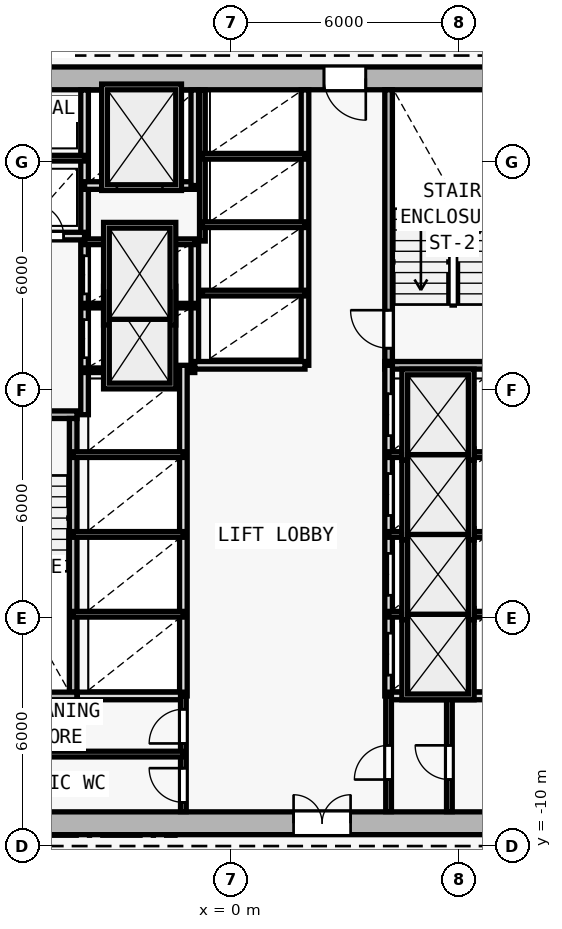
"""IFC4 building model, lengths in metres.
Left out: names, types, materials, properties, quantities, classifications, styles, units other than length and angle.
Written with IfcOpenShell. Run it as: python <this file> out.ifc"""

import sys

from ifc_helpers import new_model, si_unit, direction, frame, frame_2d, origin, origin_2d, place, context, subcontext, project, spatial, rectangle, i_section, extrude, element, fill, save


model = new_model("IFC4")
c1 = context("Model", 3, precision=1e-05, world=origin(), true_north=direction((0.0, 1.0)))
c2 = subcontext(c1, "Body", "Model", "MODEL_VIEW")
j1 = project(units=[si_unit("LENGTHUNIT", "METRE"), si_unit("PLANEANGLEUNIT", "RADIAN")], contexts=[c1])
p1 = place(None, origin())
s1 = spatial("IfcSite", under=j1, at=p1, CompositionType="ELEMENT")
p2 = place(p1, origin())
s2 = spatial("IfcBuilding", under=s1, at=p2, CompositionType="ELEMENT")
p3 = place(p2, frame((0.0, 0.0, 69.6)))
s3 = spatial("IfcBuildingStorey", under=s2, at=p3, CompositionType="ELEMENT", Elevation=69.6)
p4 = place(p3, frame((0.0, -9.4, 0.0), z_axis=(0.0, 0.0, 1.0), x_axis=(1.0, 0.0, 0.0)))
e1 = element("IfcColumn", 1, at=p4, inside=s3, PredefinedType="COLUMN", context=c2, shape_type="SweptSolid", body=[
    extrude(i_section(OverallWidth=0.416, OverallDepth=0.446, WebThickness=0.025, FlangeThickness=0.04, FilletRadius=0.015, at=origin_2d()), origin(), (0.0, 0.0, 1.0), 3.6),
])
p5 = place(p3, frame((-8.0, -9.4, 0.0), z_axis=(0.0, 0.0, 1.0), x_axis=(1.0, 0.0, 0.0)))
e2 = element("IfcWall", 2, at=p5, inside=s3, PredefinedType="SHEAR", context=c2, shape_type="SweptSolid", body=[
    extrude(rectangle(XDim=16.0, YDim=0.6, at=frame_2d((8.0, 0.0))), origin(), (0.0, 0.0, 1.0), 3.28),
])
p6 = place(p5, frame((9.65, 0.0, 0.0)))
e3 = element("IfcOpeningElement", 3, at=p6, cuts=e2, PredefinedType="OPENING", context=c2, shape_type="SweptSolid", body=[
    extrude(rectangle(XDim=1.5, YDim=2.2, at=frame_2d((0.75, 1.1))), frame((0.0, 0.31, 0.0), z_axis=(0.0, -1.0, 0.0), x_axis=(1.0, 0.0, 0.0)), (0.0, 0.0, 1.0), 0.62),
])
p7 = place(p3, frame((8.0, 10.2, 0.0), z_axis=(0.0, 0.0, 1.0), x_axis=(-1.0, 0.0, 0.0)))
e4 = element("IfcWall", 4, at=p7, inside=s3, PredefinedType="SHEAR", context=c2, shape_type="SweptSolid", body=[
    extrude(rectangle(XDim=16.0, YDim=0.6, at=frame_2d((8.0, 0.0))), origin(), (0.0, 0.0, 1.0), 3.28),
])
p8 = place(p7, frame((4.45, 0.0, 0.0)))
e5 = element("IfcOpeningElement", 5, at=p8, cuts=e4, PredefinedType="OPENING", context=c2, shape_type="SweptSolid", body=[
    extrude(rectangle(XDim=1.1, YDim=2.15, at=frame_2d((0.55, 1.075))), frame((0.0, 0.31, 0.0), z_axis=(0.0, -1.0, 0.0), x_axis=(1.0, 0.0, 0.0)), (0.0, 0.0, 1.0), 0.62),
])
p9 = place(p3, frame((-7.4, 1.35, 0.0), z_axis=(0.0, 0.0, 1.0), x_axis=(1.0, 0.0, 0.0)))
e6 = element("IfcWall", 6, at=p9, inside=s3, PredefinedType="SOLIDWALL", context=c2, shape_type="SweptSolid", body=[
    extrude(rectangle(XDim=3.35, YDim=0.2, at=frame_2d((1.675, 0.0))), origin(), (0.0, 0.0, 1.0), 3.28),
])
p10 = place(p9, frame((0.65, 0.0, 0.0)))
e7 = element("IfcOpeningElement", 7, at=p10, cuts=e6, PredefinedType="OPENING", context=c2, shape_type="SweptSolid", body=[
    extrude(rectangle(XDim=1.0, YDim=2.15, at=frame_2d((0.5, 1.075))), frame((0.0, 0.11, 0.0), z_axis=(0.0, -1.0, 0.0), x_axis=(1.0, 0.0, 0.0)), (0.0, 0.0, 1.0), 0.22),
])
p11 = place(p3, frame((-4.15, -5.95, 0.0), z_axis=(0.0, 0.0, 1.0), x_axis=(0.0, 1.0, 0.0)))
e8 = element("IfcWall", 8, at=p11, inside=s3, PredefinedType="SOLIDWALL", context=c2, shape_type="SweptSolid", body=[
    extrude(rectangle(XDim=7.2, YDim=0.2, at=frame_2d((3.6, 0.0))), origin(), (0.0, 0.0, 1.0), 3.28),
])
p12 = place(p3, frame((-3.85, 1.35, 0.0), z_axis=(0.0, 0.0, 1.0), x_axis=(0.0, 1.0, 0.0)))
e9 = element("IfcWall", 9, at=p12, inside=s3, PredefinedType="SOLIDWALL", context=c2, shape_type="SweptSolid", body=[
    extrude(rectangle(XDim=8.545, YDim=0.2, at=frame_2d((4.272, 0.0))), origin(), (0.0, 0.0, 1.0), 3.28),
])
p13 = place(p12, frame((1.5, 0.0, 0.0)))
e10 = element("IfcOpeningElement", 10, at=p13, cuts=e9, PredefinedType="OPENING", context=c2, shape_type="SweptSolid", body=[
    extrude(rectangle(XDim=1.0, YDim=2.15, at=frame_2d((0.5, 1.075))), frame((0.0, 0.11, 0.0), z_axis=(0.0, -1.0, 0.0), x_axis=(1.0, 0.0, 0.0)), (0.0, 0.0, 1.0), 0.22),
])
p14 = place(p12, frame((3.18, 0.0, 0.0)))
e11 = element("IfcOpeningElement", 11, at=p14, cuts=e9, PredefinedType="OPENING", context=c2, shape_type="SweptSolid", body=[
    extrude(rectangle(XDim=1.0, YDim=2.15, at=frame_2d((0.5, 1.075))), frame((0.0, 0.11, 0.0), z_axis=(0.0, -1.0, 0.0), x_axis=(1.0, 0.0, 0.0)), (0.0, 0.0, 1.0), 0.22),
])
p15 = place(p3, frame((-7.395, 6.05, 0.0), z_axis=(0.0, 0.0, 1.0), x_axis=(1.0, 0.0, 0.0)))
e12 = element("IfcWall", 12, at=p15, inside=s3, PredefinedType="SOLIDWALL", context=c2, shape_type="SweptSolid", body=[
    extrude(rectangle(XDim=3.545, YDim=0.2, at=frame_2d((1.772, 0.0))), origin(), (0.0, 0.0, 1.0), 3.28),
])
p16 = place(p15, frame((0.345, 0.0, 0.0)))
e13 = element("IfcOpeningElement", 13, at=p16, cuts=e12, PredefinedType="OPENING", context=c2, shape_type="SweptSolid", body=[
    extrude(rectangle(XDim=0.85, YDim=2.1, at=frame_2d((0.425, 1.05))), frame((0.0, 0.11, 0.0), z_axis=(0.0, -1.0, 0.0), x_axis=(1.0, 0.0, 0.0)), (0.0, 0.0, 1.0), 0.22),
])
p17 = place(p15, frame((2.145, 0.0, 0.0)))
e14 = element("IfcOpeningElement", 14, at=p17, cuts=e12, PredefinedType="OPENING", context=c2, shape_type="SweptSolid", body=[
    extrude(rectangle(XDim=0.85, YDim=2.1, at=frame_2d((0.425, 1.05))), frame((0.0, 0.11, 0.0), z_axis=(0.0, -1.0, 0.0), x_axis=(1.0, 0.0, 0.0)), (0.0, 0.0, 1.0), 0.22),
])
p18 = place(p3, frame((-7.395, 8.1, 0.0), z_axis=(0.0, 0.0, 1.0), x_axis=(1.0, 0.0, 0.0)))
e15 = element("IfcWall", 15, at=p18, inside=s3, PredefinedType="PARTITIONING", context=c2, shape_type="SweptSolid", body=[
    extrude(rectangle(XDim=3.545, YDim=0.15, at=frame_2d((1.772, 0.0))), origin(), (0.0, 0.0, 1.0), 3.28),
])
p19 = place(p3, frame((4.15, 2.75, 0.0), z_axis=(0.0, 0.0, 1.0), x_axis=(0.0, 1.0, 0.0)))
e16 = element("IfcWall", 16, at=p19, inside=s3, PredefinedType="SOLIDWALL", context=c2, shape_type="SweptSolid", body=[
    extrude(rectangle(XDim=7.15, YDim=0.2, at=frame_2d((3.575, 0.0))), origin(), (0.0, 0.0, 1.0), 3.28),
])
p20 = place(p19, frame((0.35, 0.0, 0.0)))
e17 = element("IfcOpeningElement", 17, at=p20, cuts=e16, PredefinedType="OPENING", context=c2, shape_type="SweptSolid", body=[
    extrude(rectangle(XDim=1.0, YDim=2.15, at=frame_2d((0.5, 1.075))), frame((0.0, 0.11, 0.0), z_axis=(0.0, -1.0, 0.0), x_axis=(1.0, 0.0, 0.0)), (0.0, 0.0, 1.0), 0.22),
])
p21 = place(p3, frame((4.05, 2.65, 0.0), z_axis=(0.0, 0.0, 1.0), x_axis=(1.0, 0.0, 0.0)))
e18 = element("IfcWall", 18, at=p21, inside=s3, PredefinedType="SOLIDWALL", context=c2, shape_type="SweptSolid", body=[
    extrude(rectangle(XDim=3.35, YDim=0.2, at=frame_2d((1.675, 0.0))), origin(), (0.0, 0.0, 1.0), 3.28),
])
p22 = place(p3, frame((-0.95, 2.65, 0.0), z_axis=(0.0, 0.0, 1.0), x_axis=(0.0, 1.0, 0.0)))
e19 = element("IfcWall", 19, at=p22, inside=s3, PredefinedType="SOLIDWALL", context=c2, shape_type="SweptSolid", body=[
    extrude(rectangle(XDim=3.27, YDim=0.2, at=frame_2d((1.635, 0.0))), origin(), (0.0, 0.0, 1.0), 3.28),
])
for number, where, z_axis, x_axis in (
    (20, (-3.85, 2.52, 0.0), (0.0, 0.0, 1.0), (1.0, 0.0, 0.0)),
    (21, (-3.85, 4.22, 0.0), (0.0, 0.0, 1.0), (1.0, 0.0, 0.0)),
):
    element("IfcWall", number, at=place(p3, frame(where, z_axis=z_axis, x_axis=x_axis)), inside=s3, PredefinedType="PARTITIONING", context=c2, shape_type="SweptSolid", body=[
        extrude(rectangle(XDim=2.9, YDim=0.12, at=frame_2d((1.45, 0.0))), origin(), (0.0, 0.0, 1.0), 3.28),
    ])
p23 = place(p3, frame((-3.85, 5.9, 0.0), z_axis=(0.0, 0.0, 1.0), x_axis=(1.0, 0.0, 0.0)))
e22 = element("IfcWall", 22, at=p23, inside=s3, PredefinedType="PARTITIONING", context=c2, shape_type="SweptSolid", body=[
    extrude(rectangle(XDim=2.9, YDim=0.15, at=frame_2d((1.45, 0.0))), origin(), (0.0, 0.0, 1.0), 3.28),
])
p24 = place(p3, frame((-3.85, 7.38, 0.0), z_axis=(0.0, 0.0, 1.0), x_axis=(1.0, 0.0, 0.0)))
e23 = element("IfcWall", 23, at=p24, inside=s3, PredefinedType="SOLIDWALL", context=c2, shape_type="SweptSolid", body=[
    extrude(rectangle(XDim=2.9, YDim=0.2, at=frame_2d((1.45, 0.0))), origin(), (0.0, 0.0, 1.0), 3.28),
])
p25 = place(p24, frame((0.85, 0.0, 0.0)))
e24 = element("IfcOpeningElement", 24, at=p25, cuts=e23, PredefinedType="OPENING", context=c2, shape_type="SweptSolid", body=[
    extrude(rectangle(XDim=1.2, YDim=2.2, at=frame_2d((0.6, 1.1))), frame((0.0, 0.11, 0.0), z_axis=(0.0, -1.0, 0.0), x_axis=(1.0, 0.0, 0.0)), (0.0, 0.0, 1.0), 0.22),
])
p26 = place(p3, frame((-0.95, 7.38, 0.0), z_axis=(0.0, 0.0, 1.0), x_axis=(0.0, 1.0, 0.0)))
e25 = element("IfcWall", 25, at=p26, inside=s3, PredefinedType="SOLIDWALL", context=c2, shape_type="SweptSolid", body=[
    extrude(rectangle(XDim=2.515, YDim=0.2, at=frame_2d((1.258, 0.0))), origin(), (0.0, 0.0, 1.0), 3.28),
])
p27 = place(p3, frame((4.15, -6.05, 0.0), z_axis=(0.0, 0.0, 1.0), x_axis=(0.0, 1.0, 0.0)))
e26 = element("IfcWall", 26, at=p27, inside=s3, PredefinedType="SOLIDWALL", context=c2, shape_type="SweptSolid", body=[
    extrude(rectangle(XDim=8.7, YDim=0.2, at=frame_2d((4.35, 0.0))), origin(), (0.0, 0.0, 1.0), 3.28),
])
p28 = place(p27, frame((0.55, 0.0, 0.0)))
e27 = element("IfcOpeningElement", 27, at=p28, cuts=e26, PredefinedType="OPENING", context=c2, shape_type="SweptSolid", body=[
    extrude(rectangle(XDim=1.1, YDim=2.15, at=frame_2d((0.55, 1.075))), frame((0.0, 0.11, 0.0), z_axis=(0.0, -1.0, 0.0), x_axis=(1.0, 0.0, 0.0)), (0.0, 0.0, 1.0), 0.22),
])
p29 = place(p27, frame((2.65, 0.0, 0.0)))
e28 = element("IfcOpeningElement", 28, at=p29, cuts=e26, PredefinedType="OPENING", context=c2, shape_type="SweptSolid", body=[
    extrude(rectangle(XDim=1.1, YDim=2.15, at=frame_2d((0.55, 1.075))), frame((0.0, 0.11, 0.0), z_axis=(0.0, -1.0, 0.0), x_axis=(1.0, 0.0, 0.0)), (0.0, 0.0, 1.0), 0.22),
])
p30 = place(p27, frame((4.75, 0.0, 0.0)))
e29 = element("IfcOpeningElement", 29, at=p30, cuts=e26, PredefinedType="OPENING", context=c2, shape_type="SweptSolid", body=[
    extrude(rectangle(XDim=1.1, YDim=2.15, at=frame_2d((0.55, 1.075))), frame((0.0, 0.11, 0.0), z_axis=(0.0, -1.0, 0.0), x_axis=(1.0, 0.0, 0.0)), (0.0, 0.0, 1.0), 0.22),
])
p31 = place(p27, frame((6.85, 0.0, 0.0)))
e30 = element("IfcOpeningElement", 30, at=p31, cuts=e26, PredefinedType="OPENING", context=c2, shape_type="SweptSolid", body=[
    extrude(rectangle(XDim=1.1, YDim=2.15, at=frame_2d((0.55, 1.075))), frame((0.0, 0.11, 0.0), z_axis=(0.0, -1.0, 0.0), x_axis=(1.0, 0.0, 0.0)), (0.0, 0.0, 1.0), 0.22),
])
for number, where, z_axis, x_axis in (
    (31, (4.15, -3.9, 0.0), (0.0, 0.0, 1.0), (1.0, 0.0, 0.0)),
    (32, (4.15, -1.8, 0.0), (0.0, 0.0, 1.0), (1.0, 0.0, 0.0)),
    (33, (4.15, 0.3, 0.0), (0.0, 0.0, 1.0), (1.0, 0.0, 0.0)),
):
    element("IfcWall", number, at=place(p3, frame(where, z_axis=z_axis, x_axis=x_axis)), inside=s3, PredefinedType="PARTITIONING", context=c2, shape_type="SweptSolid", body=[
        extrude(rectangle(XDim=2.6, YDim=0.15, at=frame_2d((1.3, 0.0))), origin(), (0.0, 0.0, 1.0), 3.28),
    ])
p32 = place(p3, frame((-1.25, -6.05, 0.0), z_axis=(0.0, 0.0, 1.0), x_axis=(0.0, 1.0, 0.0)))
e34 = element("IfcWall", 34, at=p32, inside=s3, PredefinedType="SOLIDWALL", context=c2, shape_type="SweptSolid", body=[
    extrude(rectangle(XDim=8.7, YDim=0.2, at=frame_2d((4.35, 0.0))), origin(), (0.0, 0.0, 1.0), 3.28),
])
for number, where, z_axis, x_axis in (
    (35, (-4.15, -3.9, 0.0), (0.0, 0.0, 1.0), (1.0, 0.0, 0.0)),
    (36, (-4.15, -1.8, 0.0), (0.0, 0.0, 1.0), (1.0, 0.0, 0.0)),
    (37, (-4.15, 0.3, 0.0), (0.0, 0.0, 1.0), (1.0, 0.0, 0.0)),
):
    element("IfcWall", number, at=place(p3, frame(where, z_axis=z_axis, x_axis=x_axis)), inside=s3, PredefinedType="PARTITIONING", context=c2, shape_type="SweptSolid", body=[
        extrude(rectangle(XDim=2.9, YDim=0.15, at=frame_2d((1.45, 0.0))), origin(), (0.0, 0.0, 1.0), 3.28),
    ])
p33 = place(p3, frame((1.95, 2.65, 0.0), z_axis=(0.0, 0.0, 1.0), x_axis=(0.0, 1.0, 0.0)))
e38 = element("IfcWall", 38, at=p33, inside=s3, PredefinedType="SOLIDWALL", context=c2, shape_type="SweptSolid", body=[
    extrude(rectangle(XDim=7.245, YDim=0.2, at=frame_2d((3.623, 0.0))), origin(), (0.0, 0.0, 1.0), 3.28),
])
p34 = place(p3, frame((-0.95, 2.65, 0.0), z_axis=(0.0, 0.0, 1.0), x_axis=(1.0, 0.0, 0.0)))
e39 = element("IfcWall", 39, at=p34, inside=s3, PredefinedType="SOLIDWALL", context=c2, shape_type="SweptSolid", body=[
    extrude(rectangle(XDim=2.9, YDim=0.2, at=frame_2d((1.45, 0.0))), origin(), (0.0, 0.0, 1.0), 3.28),
])
p35 = place(p3, frame((-0.75, 5.92, 0.0), z_axis=(0.0, 0.0, 1.0), x_axis=(0.0, 1.0, 0.0)))
e40 = element("IfcWall", 40, at=p35, inside=s3, PredefinedType="PARTITIONING", context=c2, shape_type="SweptSolid", body=[
    extrude(rectangle(XDim=3.975, YDim=0.15, at=frame_2d((1.988, 0.0))), origin(), (0.0, 0.0, 1.0), 3.28),
])
for number, where, z_axis, x_axis in (
    (41, (-0.75, 4.55, 0.0), (0.0, 0.0, 1.0), (1.0, 0.0, 0.0)),
    (42, (-0.75, 6.35, 0.0), (0.0, 0.0, 1.0), (1.0, 0.0, 0.0)),
    (43, (-0.75, 8.15, 0.0), (0.0, 0.0, 1.0), (1.0, 0.0, 0.0)),
):
    element("IfcWall", number, at=place(p3, frame(where, z_axis=z_axis, x_axis=x_axis)), inside=s3, PredefinedType="PARTITIONING", context=c2, shape_type="SweptSolid", body=[
        extrude(rectangle(XDim=2.7, YDim=0.15, at=frame_2d((1.35, 0.0))), origin(), (0.0, 0.0, 1.0), 3.28),
    ])
p36 = place(p3, frame((-7.4, -6.05, 0.0), z_axis=(0.0, 0.0, 1.0), x_axis=(1.0, 0.0, 0.0)))
e44 = element("IfcWall", 44, at=p36, inside=s3, PredefinedType="SOLIDWALL", context=c2, shape_type="SweptSolid", body=[
    extrude(rectangle(XDim=3.35, YDim=0.2, at=frame_2d((1.675, 0.0))), origin(), (0.0, 0.0, 1.0), 3.28),
])
p37 = place(p3, frame((-4.04, -6.05, 0.0), z_axis=(0.0, 0.0, 1.0), x_axis=(1.0, 0.0, 0.0)))
e45 = element("IfcWall", 45, at=p37, inside=s3, PredefinedType="SOLIDWALL", context=c2, shape_type="SweptSolid", body=[
    extrude(rectangle(XDim=2.79, YDim=0.2, at=frame_2d((1.395, 0.0))), origin(), (0.0, 0.0, 1.0), 3.28),
])
p38 = place(p3, frame((4.15, -6.05, 0.0), z_axis=(0.0, 0.0, 1.0), x_axis=(1.0, 0.0, 0.0)))
e46 = element("IfcWall", 46, at=p38, inside=s3, PredefinedType="SOLIDWALL", context=c2, shape_type="SweptSolid", body=[
    extrude(rectangle(XDim=3.245, YDim=0.2, at=frame_2d((1.623, 0.0))), origin(), (0.0, 0.0, 1.0), 3.28),
])
p39 = place(p3, frame((-1.25, -9.095, 0.0), z_axis=(0.0, 0.0, 1.0), x_axis=(0.0, 1.0, 0.0)))
e47 = element("IfcWall", 47, at=p39, inside=s3, PredefinedType="PARTITIONING", context=c2, shape_type="SweptSolid", body=[
    extrude(rectangle(XDim=3.045, YDim=0.15, at=frame_2d((1.522, 0.0))), origin(), (0.0, 0.0, 1.0), 3.28),
])
p40 = place(p39, frame((1.795, 0.0, 0.0)))
e48 = element("IfcOpeningElement", 48, at=p40, cuts=e47, PredefinedType="OPENING", context=c2, shape_type="SweptSolid", body=[
    extrude(rectangle(XDim=0.9, YDim=2.1, at=frame_2d((0.45, 1.05))), frame((0.0, 0.085, 0.0), z_axis=(0.0, -1.0, 0.0), x_axis=(1.0, 0.0, 0.0)), (0.0, 0.0, 1.0), 0.17),
])
p41 = place(p39, frame((0.245, 0.0, 0.0)))
e49 = element("IfcOpeningElement", 49, at=p41, cuts=e47, PredefinedType="OPENING", context=c2, shape_type="SweptSolid", body=[
    extrude(rectangle(XDim=0.9, YDim=2.1, at=frame_2d((0.45, 1.05))), frame((0.0, 0.085, 0.0), z_axis=(0.0, -1.0, 0.0), x_axis=(1.0, 0.0, 0.0)), (0.0, 0.0, 1.0), 0.17),
])
p42 = place(p3, frame((4.15, -9.095, 0.0), z_axis=(0.0, 0.0, 1.0), x_axis=(0.0, 1.0, 0.0)))
e50 = element("IfcWall", 50, at=p42, inside=s3, PredefinedType="PARTITIONING", context=c2, shape_type="SweptSolid", body=[
    extrude(rectangle(XDim=3.045, YDim=0.15, at=frame_2d((1.522, 0.0))), origin(), (0.0, 0.0, 1.0), 3.28),
])
p43 = place(p42, frame((0.845, 0.0, 0.0)))
e51 = element("IfcOpeningElement", 51, at=p43, cuts=e50, PredefinedType="OPENING", context=c2, shape_type="SweptSolid", body=[
    extrude(rectangle(XDim=0.9, YDim=2.1, at=frame_2d((0.45, 1.05))), frame((0.0, 0.085, 0.0), z_axis=(0.0, -1.0, 0.0), x_axis=(1.0, 0.0, 0.0)), (0.0, 0.0, 1.0), 0.17),
])
p44 = place(p3, frame((-7.395, -7.58, 0.0), z_axis=(0.0, 0.0, 1.0), x_axis=(1.0, 0.0, 0.0)))
e52 = element("IfcWall", 52, at=p44, inside=s3, PredefinedType="PARTITIONING", context=c2, shape_type="SweptSolid", body=[
    extrude(rectangle(XDim=6.145, YDim=0.15, at=frame_2d((3.073, 0.0))), origin(), (0.0, 0.0, 1.0), 3.28),
])
p45 = place(p3, frame((5.75, -9.095, 0.0), z_axis=(0.0, 0.0, 1.0), x_axis=(0.0, 1.0, 0.0)))
e53 = element("IfcWall", 53, at=p45, inside=s3, PredefinedType="PARTITIONING", context=c2, shape_type="SweptSolid", body=[
    extrude(rectangle(XDim=3.045, YDim=0.15, at=frame_2d((1.522, 0.0))), origin(), (0.0, 0.0, 1.0), 3.28),
])
p46 = place(p45, frame((0.845, 0.0, 0.0)))
e54 = element("IfcOpeningElement", 54, at=p46, cuts=e53, PredefinedType="OPENING", context=c2, shape_type="SweptSolid", body=[
    extrude(rectangle(XDim=0.9, YDim=2.1, at=frame_2d((0.45, 1.05))), frame((0.0, 0.085, 0.0), z_axis=(0.0, -1.0, 0.0), x_axis=(1.0, 0.0, 0.0)), (0.0, 0.0, 1.0), 0.17),
])
p47 = place(p6, origin())
e55 = element("IfcDoor", 55, at=p47, inside=s3, OperationType="DOUBLE_DOOR_SINGLE_SWING", PredefinedType="DOOR", context=c2, shape_type="SweptSolid", body=[
    extrude(rectangle(XDim=1.5, YDim=2.2, at=frame_2d((0.75, 1.1))), frame((0.0, 0.025, 0.0), z_axis=(0.0, -1.0, 0.0), x_axis=(1.0, 0.0, 0.0)), (0.0, 0.0, 1.0), 0.05),
])
fill(e3, e55)
p48 = place(p8, origin())
e56 = element("IfcDoor", 56, at=p48, inside=s3, OperationType="SINGLE_SWING_LEFT", PredefinedType="DOOR", context=c2, shape_type="SweptSolid", body=[
    extrude(rectangle(XDim=1.1, YDim=2.15, at=frame_2d((0.55, 1.075))), frame((0.0, 0.025, 0.0), z_axis=(0.0, -1.0, 0.0), x_axis=(1.0, 0.0, 0.0)), (0.0, 0.0, 1.0), 0.05),
])
fill(e5, e56)
p49 = place(p17, origin())
e57 = element("IfcDoor", 57, at=p49, inside=s3, OperationType="SINGLE_SWING_LEFT", PredefinedType="DOOR", context=c2, shape_type="SweptSolid", body=[
    extrude(rectangle(XDim=0.85, YDim=2.1, at=frame_2d((0.425, 1.05))), frame((0.0, 0.025, 0.0), z_axis=(0.0, -1.0, 0.0), x_axis=(1.0, 0.0, 0.0)), (0.0, 0.0, 1.0), 0.05),
])
fill(e14, e57)
p50 = place(p20, origin())
e58 = element("IfcDoor", 58, at=p50, inside=s3, OperationType="SINGLE_SWING_RIGHT", PredefinedType="DOOR", context=c2, shape_type="SweptSolid", body=[
    extrude(rectangle(XDim=1.0, YDim=2.15, at=frame_2d((0.5, 1.075))), frame((0.0, 0.025, 0.0), z_axis=(0.0, -1.0, 0.0), x_axis=(1.0, 0.0, 0.0)), (0.0, 0.0, 1.0), 0.05),
])
fill(e17, e58)
p51 = place(p25, origin())
e59 = element("IfcDoor", 59, at=p51, inside=s3, OperationType="DOUBLE_DOOR_SLIDING", PredefinedType="DOOR", context=c2, shape_type="SweptSolid", body=[
    extrude(rectangle(XDim=1.2, YDim=2.2, at=frame_2d((0.6, 1.1))), frame((0.0, 0.025, 0.0), z_axis=(0.0, -1.0, 0.0), x_axis=(1.0, 0.0, 0.0)), (0.0, 0.0, 1.0), 0.05),
])
fill(e24, e59)
p52 = place(p28, origin())
e60 = element("IfcDoor", 60, at=p52, inside=s3, OperationType="DOUBLE_DOOR_SLIDING", PredefinedType="DOOR", context=c2, shape_type="SweptSolid", body=[
    extrude(rectangle(XDim=1.1, YDim=2.15, at=frame_2d((0.55, 1.075))), frame((0.0, 0.025, 0.0), z_axis=(0.0, -1.0, 0.0), x_axis=(1.0, 0.0, 0.0)), (0.0, 0.0, 1.0), 0.05),
])
fill(e27, e60)
p53 = place(p29, origin())
e61 = element("IfcDoor", 61, at=p53, inside=s3, OperationType="DOUBLE_DOOR_SLIDING", PredefinedType="DOOR", context=c2, shape_type="SweptSolid", body=[
    extrude(rectangle(XDim=1.1, YDim=2.15, at=frame_2d((0.55, 1.075))), frame((0.0, 0.025, 0.0), z_axis=(0.0, -1.0, 0.0), x_axis=(1.0, 0.0, 0.0)), (0.0, 0.0, 1.0), 0.05),
])
fill(e28, e61)
p54 = place(p30, origin())
e62 = element("IfcDoor", 62, at=p54, inside=s3, OperationType="DOUBLE_DOOR_SLIDING", PredefinedType="DOOR", context=c2, shape_type="SweptSolid", body=[
    extrude(rectangle(XDim=1.1, YDim=2.15, at=frame_2d((0.55, 1.075))), frame((0.0, 0.025, 0.0), z_axis=(0.0, -1.0, 0.0), x_axis=(1.0, 0.0, 0.0)), (0.0, 0.0, 1.0), 0.05),
])
fill(e29, e62)
p55 = place(p31, origin())
e63 = element("IfcDoor", 63, at=p55, inside=s3, OperationType="DOUBLE_DOOR_SLIDING", PredefinedType="DOOR", context=c2, shape_type="SweptSolid", body=[
    extrude(rectangle(XDim=1.1, YDim=2.15, at=frame_2d((0.55, 1.075))), frame((0.0, 0.025, 0.0), z_axis=(0.0, -1.0, 0.0), x_axis=(1.0, 0.0, 0.0)), (0.0, 0.0, 1.0), 0.05),
])
fill(e30, e63)
p56 = place(p13, origin())
e64 = element("IfcDoor", 64, at=p56, inside=s3, OperationType="DOUBLE_DOOR_SLIDING", PredefinedType="DOOR", context=c2, shape_type="SweptSolid", body=[
    extrude(rectangle(XDim=1.0, YDim=2.15, at=frame_2d((0.5, 1.075))), frame((0.0, 0.025, 0.0), z_axis=(0.0, -1.0, 0.0), x_axis=(1.0, 0.0, 0.0)), (0.0, 0.0, 1.0), 0.05),
])
fill(e10, e64)
p57 = place(p14, origin())
e65 = element("IfcDoor", 65, at=p57, inside=s3, OperationType="DOUBLE_DOOR_SLIDING", PredefinedType="DOOR", context=c2, shape_type="SweptSolid", body=[
    extrude(rectangle(XDim=1.0, YDim=2.15, at=frame_2d((0.5, 1.075))), frame((0.0, 0.025, 0.0), z_axis=(0.0, -1.0, 0.0), x_axis=(1.0, 0.0, 0.0)), (0.0, 0.0, 1.0), 0.05),
])
fill(e11, e65)
p58 = place(p40, origin())
e66 = element("IfcDoor", 66, at=p58, inside=s3, OperationType="SINGLE_SWING_LEFT", PredefinedType="DOOR", context=c2, shape_type="SweptSolid", body=[
    extrude(rectangle(XDim=0.9, YDim=2.1, at=frame_2d((0.45, 1.05))), frame((0.0, 0.025, 0.0), z_axis=(0.0, -1.0, 0.0), x_axis=(1.0, 0.0, 0.0)), (0.0, 0.0, 1.0), 0.05),
])
fill(e48, e66)
p59 = place(p41, origin())
e67 = element("IfcDoor", 67, at=p59, inside=s3, OperationType="SINGLE_SWING_RIGHT", PredefinedType="DOOR", context=c2, shape_type="SweptSolid", body=[
    extrude(rectangle(XDim=0.9, YDim=2.1, at=frame_2d((0.45, 1.05))), frame((0.0, 0.025, 0.0), z_axis=(0.0, -1.0, 0.0), x_axis=(1.0, 0.0, 0.0)), (0.0, 0.0, 1.0), 0.05),
])
fill(e49, e67)
p60 = place(p43, origin())
e68 = element("IfcDoor", 68, at=p60, inside=s3, OperationType="SINGLE_SWING_LEFT", PredefinedType="DOOR", context=c2, shape_type="SweptSolid", body=[
    extrude(rectangle(XDim=0.9, YDim=2.1, at=frame_2d((0.45, 1.05))), frame((0.0, 0.025, 0.0), z_axis=(0.0, -1.0, 0.0), x_axis=(1.0, 0.0, 0.0)), (0.0, 0.0, 1.0), 0.05),
])
fill(e51, e68)
p61 = place(p46, origin())
e69 = element("IfcDoor", 69, at=p61, inside=s3, OperationType="SINGLE_SWING_RIGHT", PredefinedType="DOOR", context=c2, shape_type="SweptSolid", body=[
    extrude(rectangle(XDim=0.9, YDim=2.1, at=frame_2d((0.45, 1.05))), frame((0.0, 0.025, 0.0), z_axis=(0.0, -1.0, 0.0), x_axis=(1.0, 0.0, 0.0)), (0.0, 0.0, 1.0), 0.05),
])
fill(e54, e69)
save(model, sys.argv[1])
